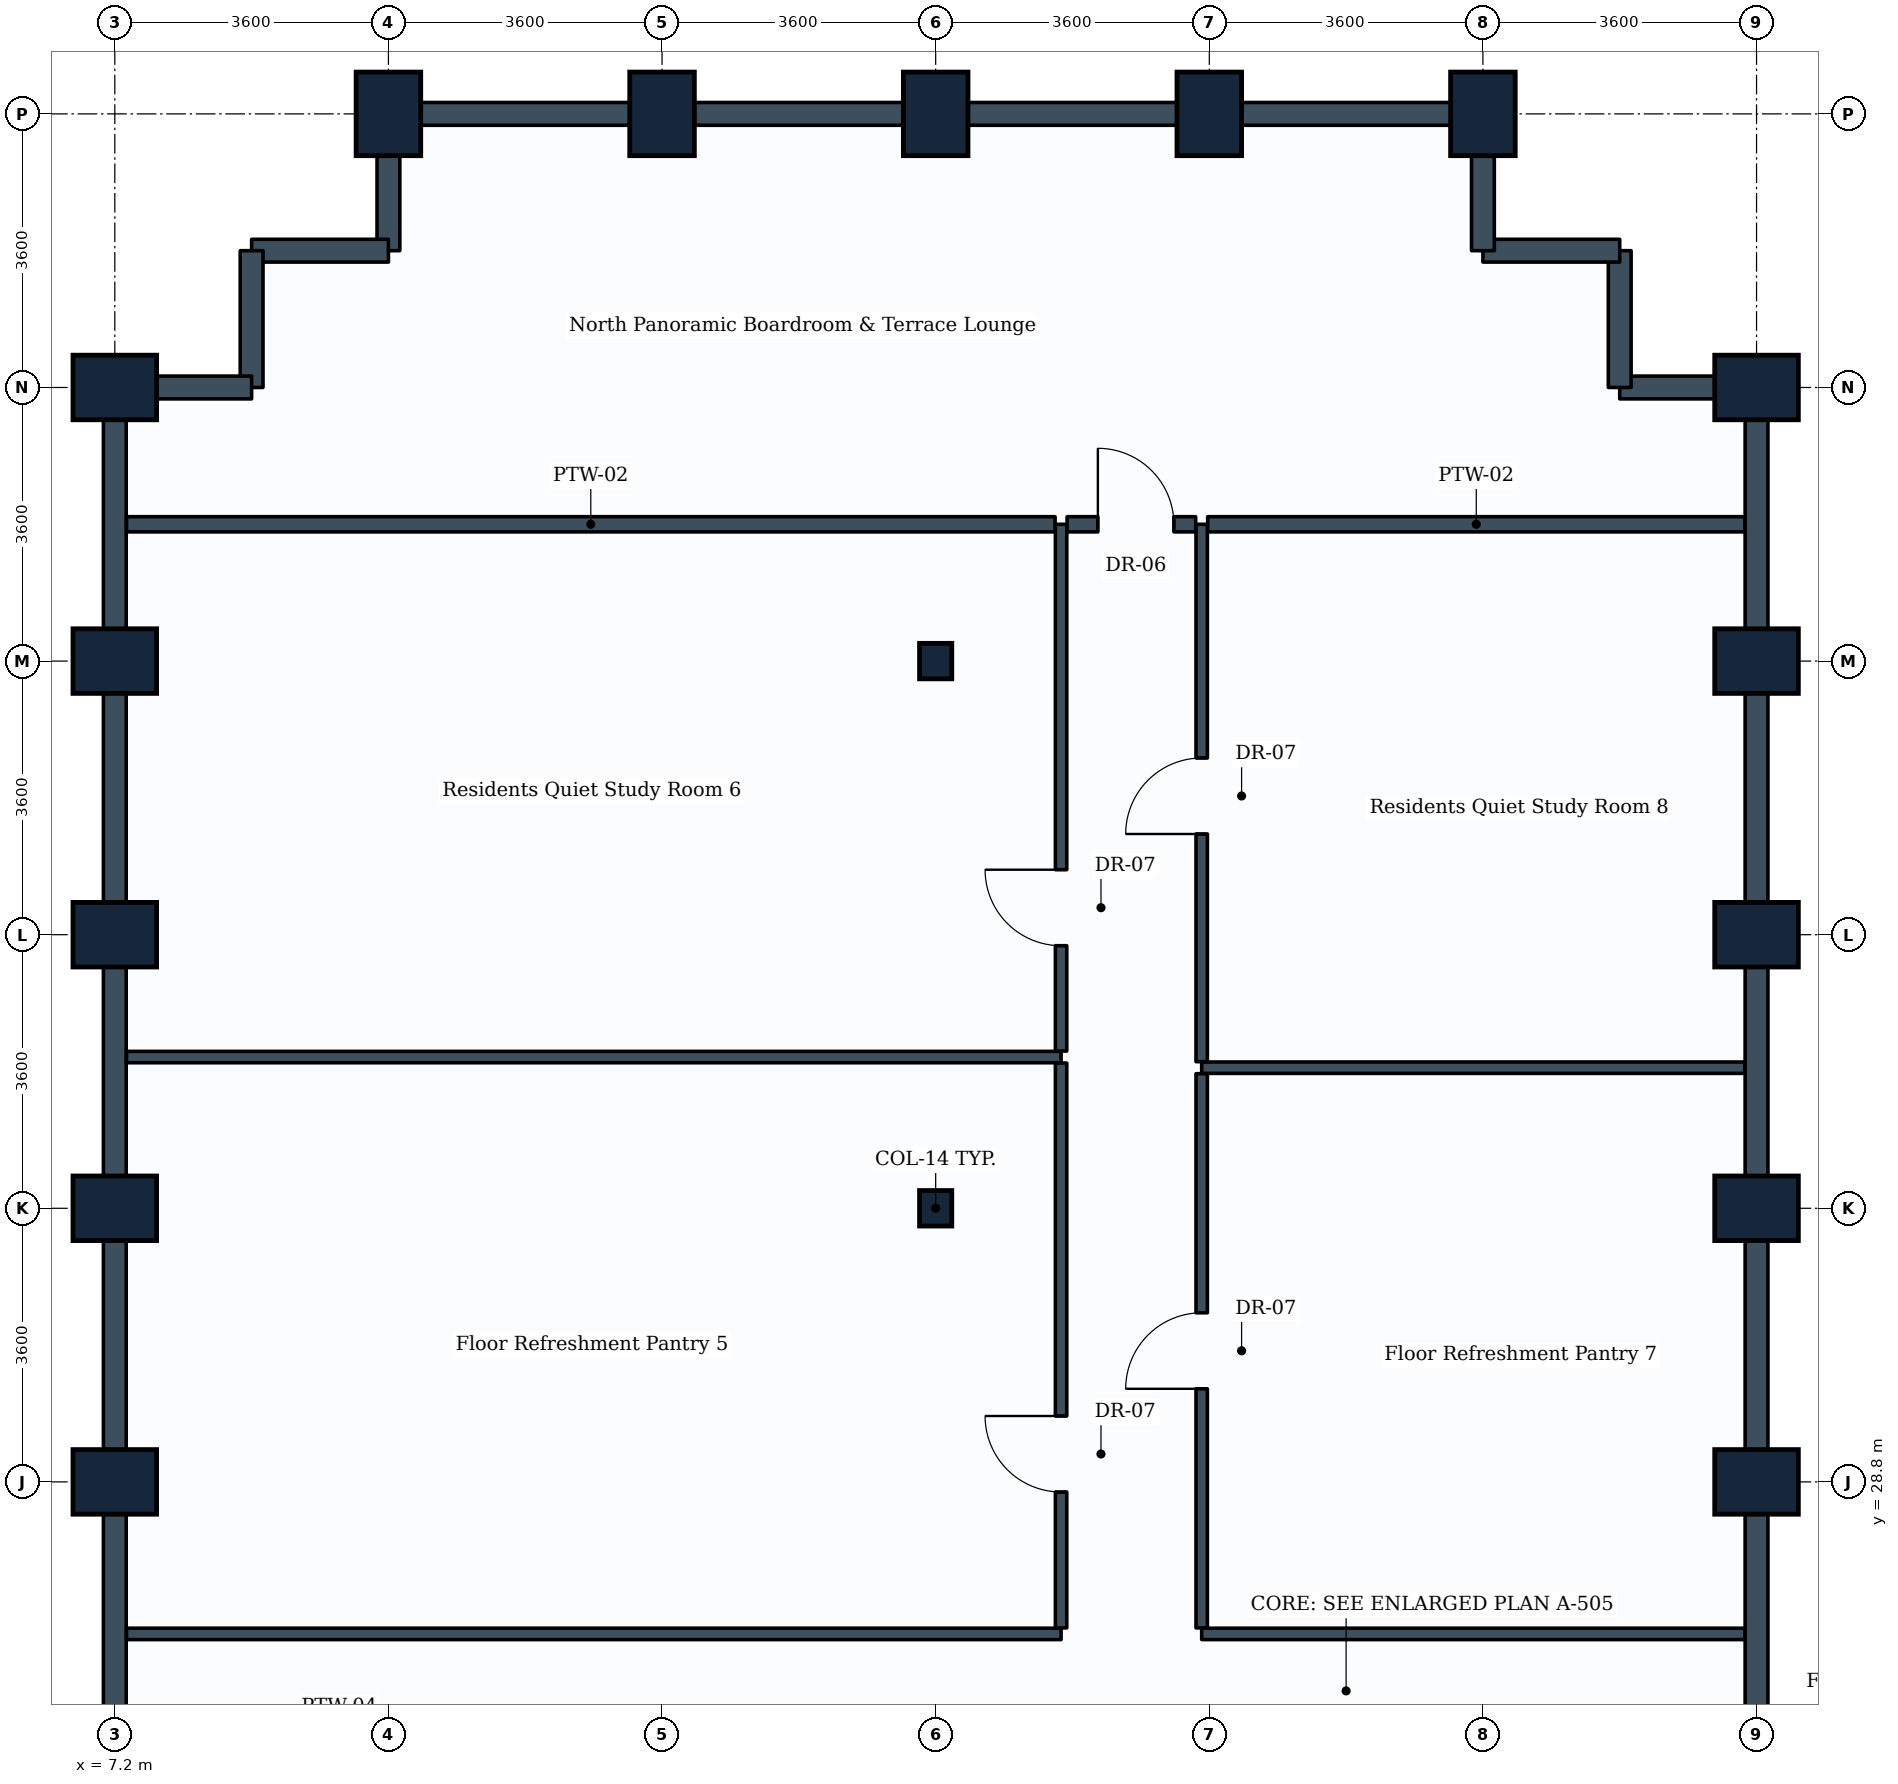
"""IFC4 building model, lengths in metres.
Left out: names, types, materials, properties, quantities, classifications, styles, units other than length and angle.
Written with IfcOpenShell. Run it as: python <this file> out.ifc"""

import sys

from ifc_helpers import new_model, si_unit, direction, frame, frame_2d, origin, origin_2d, place, context, subcontext, project, spatial, rectangle, i_section, extrude, element, fill, save


model = new_model("IFC4")
c1 = context("Model", 3, precision=1e-05, world=origin(), true_north=direction((0.0, 1.0)))
c2 = subcontext(c1, "Body", "Model", "MODEL_VIEW")
j1 = project(units=[si_unit("LENGTHUNIT", "METRE"), si_unit("PLANEANGLEUNIT", "RADIAN")], contexts=[c1])
p1 = place(None, origin())
s1 = spatial("IfcSite", under=j1, at=p1, CompositionType="ELEMENT")
p2 = place(p1, origin())
s2 = spatial("IfcBuilding", under=s1, at=p2, CompositionType="ELEMENT")
p3 = place(p2, frame((0.0, 0.0, 99.6)))
s3 = spatial("IfcBuildingStorey", under=s2, at=p3, CompositionType="ELEMENT", Elevation=99.6)
for number, where, z_axis, x_axis in (
    (1, (7.2, 28.8, 0.0), (0.0, 0.0, 1.0), (0.0, 1.0, 0.0)),
    (2, (7.2, 32.4, 0.0), (0.0, 0.0, 1.0), (0.0, 1.0, 0.0)),
    (3, (7.2, 36.0, 0.0), (0.0, 0.0, 1.0), (0.0, 1.0, 0.0)),
    (4, (7.2, 39.6, 0.0), (0.0, 0.0, 1.0), (0.0, 1.0, 0.0)),
    (5, (7.2, 43.2, 0.0), (0.0, 0.0, 1.0), (0.0, 1.0, 0.0)),
    (6, (10.8, 46.8, 0.0), (0.0, 0.0, 1.0), (1.0, 0.0, 0.0)),
    (7, (14.4, 46.8, 0.0), (0.0, 0.0, 1.0), (1.0, 0.0, 0.0)),
):
    element("IfcColumn", number, at=place(p3, frame(where, z_axis=z_axis, x_axis=x_axis)), inside=s3, PredefinedType="COLUMN", context=c2, shape_type="SweptSolid", body=[
        extrude(rectangle(XDim=0.85, YDim=1.1, at=origin_2d()), origin(), (0.0, 0.0, 1.0), 3.9),
    ])
for number, where, z_axis, x_axis in (
    (8, (18.0, 32.4, 0.0), (0.0, 0.0, 1.0), (1.0, 0.0, 0.0)),
    (9, (18.0, 39.6, 0.0), (0.0, 0.0, 1.0), (1.0, 0.0, 0.0)),
):
    element("IfcColumn", number, at=place(p3, frame(where, z_axis=z_axis, x_axis=x_axis)), inside=s3, PredefinedType="COLUMN", context=c2, shape_type="SweptSolid", body=[
        extrude(i_section(OverallWidth=0.424, OverallDepth=0.467, WebThickness=0.033, FlangeThickness=0.053, FilletRadius=0.015, at=origin_2d()), origin(), (0.0, 0.0, 1.0), 3.9),
    ])
for number, where, z_axis, x_axis in (
    (10, (18.0, 46.8, 0.0), (0.0, 0.0, 1.0), (1.0, 0.0, 0.0)),
    (11, (21.6, 46.8, 0.0), (0.0, 0.0, 1.0), (1.0, 0.0, 0.0)),
    (12, (25.2, 46.8, 0.0), (0.0, 0.0, 1.0), (1.0, 0.0, 0.0)),
    (13, (28.8, 28.8, 0.0), (0.0, 0.0, 1.0), (0.0, 1.0, 0.0)),
    (14, (28.8, 32.4, 0.0), (0.0, 0.0, 1.0), (0.0, 1.0, 0.0)),
    (15, (28.8, 36.0, 0.0), (0.0, 0.0, 1.0), (0.0, 1.0, 0.0)),
    (16, (28.8, 39.6, 0.0), (0.0, 0.0, 1.0), (0.0, 1.0, 0.0)),
    (17, (28.8, 43.2, 0.0), (0.0, 0.0, 1.0), (0.0, 1.0, 0.0)),
):
    element("IfcColumn", number, at=place(p3, frame(where, z_axis=z_axis, x_axis=x_axis)), inside=s3, PredefinedType="COLUMN", context=c2, shape_type="SweptSolid", body=[
        extrude(rectangle(XDim=0.85, YDim=1.1, at=origin_2d()), origin(), (0.0, 0.0, 1.0), 3.9),
    ])
p4 = place(p3, frame((28.8, 28.8, 0.0), z_axis=(0.0, 0.0, 1.0), x_axis=(0.0, -1.0, 0.0)))
e18 = element("IfcWall", 18, at=p4, inside=s3, PredefinedType="STANDARD", context=c2, shape_type="SweptSolid", body=[
    extrude(rectangle(XDim=3.6, YDim=0.3, at=frame_2d((1.8, 0.0))), origin(), (0.0, 0.0, 1.0), 3.19),
])
p5 = place(p3, frame((28.8, 32.4, 0.0), z_axis=(0.0, 0.0, 1.0), x_axis=(0.0, -1.0, 0.0)))
e19 = element("IfcWall", 19, at=p5, inside=s3, PredefinedType="STANDARD", context=c2, shape_type="SweptSolid", body=[
    extrude(rectangle(XDim=3.6, YDim=0.3, at=frame_2d((1.8, 0.0))), origin(), (0.0, 0.0, 1.0), 2.93),
])
for number, where, z_axis, x_axis in (
    (20, (28.8, 36.0, 0.0), (0.0, 0.0, 1.0), (0.0, -1.0, 0.0)),
    (21, (28.8, 39.6, 0.0), (0.0, 0.0, 1.0), (0.0, -1.0, 0.0)),
):
    element("IfcWall", number, at=place(p3, frame(where, z_axis=z_axis, x_axis=x_axis)), inside=s3, PredefinedType="STANDARD", context=c2, shape_type="SweptSolid", body=[
        extrude(rectangle(XDim=3.6, YDim=0.3, at=frame_2d((1.8, 0.0))), origin(), (0.0, 0.0, 1.0), 2.93),
    ])
p6 = place(p3, frame((28.8, 43.2, 0.0), z_axis=(0.0, 0.0, 1.0), x_axis=(0.0, -1.0, 0.0)))
e22 = element("IfcWall", 22, at=p6, inside=s3, PredefinedType="STANDARD", context=c2, shape_type="SweptSolid", body=[
    extrude(rectangle(XDim=3.6, YDim=0.3, at=frame_2d((1.8, 0.0))), origin(), (0.0, 0.0, 1.0), 2.93),
])
p7 = place(p3, frame((27.0, 43.2, 0.0), z_axis=(0.0, 0.0, 1.0), x_axis=(1.0, 0.0, 0.0)))
e23 = element("IfcWall", 23, at=p7, inside=s3, PredefinedType="STANDARD", context=c2, shape_type="SweptSolid", body=[
    extrude(rectangle(XDim=1.8, YDim=0.3, at=frame_2d((0.9, 0.0))), origin(), (0.0, 0.0, 1.0), 2.93),
])
for number, where, z_axis, x_axis in (
    (24, (27.0, 43.2, 0.0), (0.0, 0.0, 1.0), (0.0, 1.0, 0.0)),
    (25, (25.2, 45.0, 0.0), (0.0, 0.0, 1.0), (1.0, 0.0, 0.0)),
):
    element("IfcWall", number, at=place(p3, frame(where, z_axis=z_axis, x_axis=x_axis)), inside=s3, PredefinedType="STANDARD", context=c2, shape_type="SweptSolid", body=[
        extrude(rectangle(XDim=1.8, YDim=0.3, at=frame_2d((0.9, 0.0))), origin(), (0.0, 0.0, 1.0), 3.635),
    ])
p8 = place(p3, frame((25.2, 45.0, 0.0), z_axis=(0.0, 0.0, 1.0), x_axis=(0.0, 1.0, 0.0)))
e26 = element("IfcWall", 26, at=p8, inside=s3, PredefinedType="STANDARD", context=c2, shape_type="SweptSolid", body=[
    extrude(rectangle(XDim=1.8, YDim=0.3, at=frame_2d((0.9, 0.0))), origin(), (0.0, 0.0, 1.0), 2.93),
])
p9 = place(p3, frame((21.6, 46.8, 0.0), z_axis=(0.0, 0.0, 1.0), x_axis=(1.0, 0.0, 0.0)))
e27 = element("IfcWall", 27, at=p9, inside=s3, PredefinedType="STANDARD", context=c2, shape_type="SweptSolid", body=[
    extrude(rectangle(XDim=3.6, YDim=0.3, at=frame_2d((1.8, 0.0))), origin(), (0.0, 0.0, 1.0), 2.93),
])
for number, where, z_axis, x_axis in (
    (28, (18.0, 46.8, 0.0), (0.0, 0.0, 1.0), (1.0, 0.0, 0.0)),
    (29, (14.4, 46.8, 0.0), (0.0, 0.0, 1.0), (1.0, 0.0, 0.0)),
):
    element("IfcWall", number, at=place(p3, frame(where, z_axis=z_axis, x_axis=x_axis)), inside=s3, PredefinedType="STANDARD", context=c2, shape_type="SweptSolid", body=[
        extrude(rectangle(XDim=3.6, YDim=0.3, at=frame_2d((1.8, 0.0))), origin(), (0.0, 0.0, 1.0), 2.93),
    ])
p10 = place(p3, frame((10.8, 46.8, 0.0), z_axis=(0.0, 0.0, 1.0), x_axis=(1.0, 0.0, 0.0)))
e30 = element("IfcWall", 30, at=p10, inside=s3, PredefinedType="STANDARD", context=c2, shape_type="SweptSolid", body=[
    extrude(rectangle(XDim=3.6, YDim=0.3, at=frame_2d((1.8, 0.0))), origin(), (0.0, 0.0, 1.0), 2.93),
])
p11 = place(p3, frame((10.8, 45.0, 0.0), z_axis=(0.0, 0.0, 1.0), x_axis=(0.0, 1.0, 0.0)))
e31 = element("IfcWall", 31, at=p11, inside=s3, PredefinedType="STANDARD", context=c2, shape_type="SweptSolid", body=[
    extrude(rectangle(XDim=1.8, YDim=0.3, at=frame_2d((0.9, 0.0))), origin(), (0.0, 0.0, 1.0), 2.93),
])
for number, where, z_axis, x_axis in (
    (32, (9.0, 45.0, 0.0), (0.0, 0.0, 1.0), (1.0, 0.0, 0.0)),
    (33, (9.0, 43.2, 0.0), (0.0, 0.0, 1.0), (0.0, 1.0, 0.0)),
):
    element("IfcWall", number, at=place(p3, frame(where, z_axis=z_axis, x_axis=x_axis)), inside=s3, PredefinedType="STANDARD", context=c2, shape_type="SweptSolid", body=[
        extrude(rectangle(XDim=1.8, YDim=0.3, at=frame_2d((0.9, 0.0))), origin(), (0.0, 0.0, 1.0), 3.635),
    ])
p12 = place(p3, frame((7.2, 43.2, 0.0), z_axis=(0.0, 0.0, 1.0), x_axis=(1.0, 0.0, 0.0)))
e34 = element("IfcWall", 34, at=p12, inside=s3, PredefinedType="STANDARD", context=c2, shape_type="SweptSolid", body=[
    extrude(rectangle(XDim=1.8, YDim=0.3, at=frame_2d((0.9, 0.0))), origin(), (0.0, 0.0, 1.0), 2.93),
])
p13 = place(p3, frame((7.2, 39.6, 0.0), z_axis=(0.0, 0.0, 1.0), x_axis=(0.0, 1.0, 0.0)))
e35 = element("IfcWall", 35, at=p13, inside=s3, PredefinedType="STANDARD", context=c2, shape_type="SweptSolid", body=[
    extrude(rectangle(XDim=3.6, YDim=0.3, at=frame_2d((1.8, 0.0))), origin(), (0.0, 0.0, 1.0), 2.93),
])
for number, where, z_axis, x_axis in (
    (36, (7.2, 36.0, 0.0), (0.0, 0.0, 1.0), (0.0, 1.0, 0.0)),
    (37, (7.2, 32.4, 0.0), (0.0, 0.0, 1.0), (0.0, 1.0, 0.0)),
):
    element("IfcWall", number, at=place(p3, frame(where, z_axis=z_axis, x_axis=x_axis)), inside=s3, PredefinedType="STANDARD", context=c2, shape_type="SweptSolid", body=[
        extrude(rectangle(XDim=3.6, YDim=0.3, at=frame_2d((1.8, 0.0))), origin(), (0.0, 0.0, 1.0), 2.93),
    ])
p14 = place(p3, frame((7.2, 28.8, 0.0), z_axis=(0.0, 0.0, 1.0), x_axis=(0.0, 1.0, 0.0)))
e38 = element("IfcWall", 38, at=p14, inside=s3, PredefinedType="STANDARD", context=c2, shape_type="SweptSolid", body=[
    extrude(rectangle(XDim=3.6, YDim=0.3, at=frame_2d((1.8, 0.0))), origin(), (0.0, 0.0, 1.0), 2.93),
])
p15 = place(p3, frame((7.2, 25.2, 0.0), z_axis=(0.0, 0.0, 1.0), x_axis=(0.0, 1.0, 0.0)))
e39 = element("IfcWall", 39, at=p15, inside=s3, PredefinedType="STANDARD", context=c2, shape_type="SweptSolid", body=[
    extrude(rectangle(XDim=3.6, YDim=0.3, at=frame_2d((1.8, 0.0))), origin(), (0.0, 0.0, 1.0), 2.93),
])
for number, where, z_axis, x_axis in (
    (40, (7.354, 26.8, 0.0), (0.0, 0.0, 1.0), (1.0, 0.0, 0.0)),
    (41, (7.354, 34.39, 0.0), (0.0, 0.0, 1.0), (1.0, 0.0, 0.0)),
):
    element("IfcWall", number, at=place(p3, frame(where, z_axis=z_axis, x_axis=x_axis)), inside=s3, PredefinedType="PARTITIONING", context=c2, shape_type="SweptSolid", body=[
        extrude(rectangle(XDim=12.296, YDim=0.15, at=frame_2d((6.148, 0.0))), origin(), (0.0, 0.0, 1.0), 2.93),
    ])
p16 = place(p3, frame((19.65, 26.879, 0.0), z_axis=(0.0, 0.0, 1.0), x_axis=(0.0, 1.0, 0.0)))
e42 = element("IfcWall", 42, at=p16, inside=s3, PredefinedType="PARTITIONING", context=c2, shape_type="SweptSolid", body=[
    extrude(rectangle(XDim=7.432, YDim=0.15, at=frame_2d((3.716, 0.0))), origin(), (0.0, 0.0, 1.0), 3.19),
])
p17 = place(p16, frame((1.788, 0.0, 0.0)))
e43 = element("IfcOpeningElement", 43, at=p17, cuts=e42, PredefinedType="OPENING", context=c2, shape_type="SweptSolid", body=[
    extrude(rectangle(XDim=1.0, YDim=2.1, at=frame_2d((0.5, 1.05))), frame((0.0, 0.085, 0.0), z_axis=(0.0, -1.0, 0.0), x_axis=(1.0, 0.0, 0.0)), (0.0, 0.0, 1.0), 0.17),
])
p18 = place(p3, frame((19.65, 34.469, 0.0), z_axis=(0.0, 0.0, 1.0), x_axis=(0.0, 1.0, 0.0)))
e44 = element("IfcWall", 44, at=p18, inside=s3, PredefinedType="PARTITIONING", context=c2, shape_type="SweptSolid", body=[
    extrude(rectangle(XDim=6.931, YDim=0.15, at=frame_2d((3.465, 0.0))), origin(), (0.0, 0.0, 1.0), 3.19),
])
p19 = place(p18, frame((1.386, 0.0, 0.0)))
e45 = element("IfcOpeningElement", 45, at=p19, cuts=e44, PredefinedType="OPENING", context=c2, shape_type="SweptSolid", body=[
    extrude(rectangle(XDim=1.0, YDim=2.1, at=frame_2d((0.5, 1.05))), frame((0.0, 0.085, 0.0), z_axis=(0.0, -1.0, 0.0), x_axis=(1.0, 0.0, 0.0)), (0.0, 0.0, 1.0), 0.17),
])
p20 = place(p3, frame((21.5, 26.8, 0.0), z_axis=(0.0, 0.0, 1.0), x_axis=(1.0, 0.0, 0.0)))
e46 = element("IfcWall", 46, at=p20, inside=s3, PredefinedType="PARTITIONING", context=c2, shape_type="SweptSolid", body=[
    extrude(rectangle(XDim=7.146, YDim=0.15, at=frame_2d((3.573, 0.0))), origin(), (0.0, 0.0, 1.0), 3.635),
])
p21 = place(p3, frame((21.5, 34.25, 0.0), z_axis=(0.0, 0.0, 1.0), x_axis=(1.0, 0.0, 0.0)))
e47 = element("IfcWall", 47, at=p21, inside=s3, PredefinedType="PARTITIONING", context=c2, shape_type="SweptSolid", body=[
    extrude(rectangle(XDim=7.146, YDim=0.15, at=frame_2d((3.573, 0.0))), origin(), (0.0, 0.0, 1.0), 2.93),
])
p22 = place(p3, frame((21.5, 26.879, 0.0), z_axis=(0.0, 0.0, 1.0), x_axis=(0.0, 1.0, 0.0)))
e48 = element("IfcWall", 48, at=p22, inside=s3, PredefinedType="PARTITIONING", context=c2, shape_type="SweptSolid", body=[
    extrude(rectangle(XDim=7.292, YDim=0.15, at=frame_2d((3.646, 0.0))), origin(), (0.0, 0.0, 1.0), 3.19),
])
p23 = place(p22, frame((3.146, 0.0, 0.0)))
e49 = element("IfcOpeningElement", 49, at=p23, cuts=e48, PredefinedType="OPENING", context=c2, shape_type="SweptSolid", body=[
    extrude(rectangle(XDim=1.0, YDim=2.1, at=frame_2d((0.5, 1.05))), frame((0.0, 0.085, 0.0), z_axis=(0.0, -1.0, 0.0), x_axis=(1.0, 0.0, 0.0)), (0.0, 0.0, 1.0), 0.17),
])
p24 = place(p3, frame((21.5, 34.329, 0.0), z_axis=(0.0, 0.0, 1.0), x_axis=(0.0, 1.0, 0.0)))
e50 = element("IfcWall", 50, at=p24, inside=s3, PredefinedType="PARTITIONING", context=c2, shape_type="SweptSolid", body=[
    extrude(rectangle(XDim=7.071, YDim=0.15, at=frame_2d((3.535, 0.0))), origin(), (0.0, 0.0, 1.0), 3.18),
])
p25 = place(p24, frame((2.996, 0.0, 0.0)))
e51 = element("IfcOpeningElement", 51, at=p25, cuts=e50, PredefinedType="OPENING", context=c2, shape_type="SweptSolid", body=[
    extrude(rectangle(XDim=1.0, YDim=2.1, at=frame_2d((0.5, 1.05))), frame((0.0, 0.085, 0.0), z_axis=(0.0, -1.0, 0.0), x_axis=(1.0, 0.0, 0.0)), (0.0, 0.0, 1.0), 0.17),
])
p26 = place(p3, frame((7.354, 41.4, 0.0), z_axis=(0.0, 0.0, 1.0), x_axis=(1.0, 0.0, 0.0)))
e52 = element("IfcWall", 52, at=p26, inside=s3, PredefinedType="PARTITIONING", context=c2, shape_type="SweptSolid", body=[
    extrude(rectangle(XDim=12.217, YDim=0.2, at=frame_2d((6.108, 0.0))), origin(), (0.0, 0.0, 1.0), 2.93),
])
p27 = place(p3, frame((21.579, 41.4, 0.0), z_axis=(0.0, 0.0, 1.0), x_axis=(1.0, 0.0, 0.0)))
e53 = element("IfcWall", 53, at=p27, inside=s3, PredefinedType="PARTITIONING", context=c2, shape_type="SweptSolid", body=[
    extrude(rectangle(XDim=7.067, YDim=0.2, at=frame_2d((3.533, 0.0))), origin(), (0.0, 0.0, 1.0), 2.93),
])
p28 = place(p3, frame((19.729, 41.4, 0.0), z_axis=(0.0, 0.0, 1.0), x_axis=(1.0, 0.0, 0.0)))
e54 = element("IfcWall", 54, at=p28, inside=s3, PredefinedType="PARTITIONING", context=c2, shape_type="SweptSolid", body=[
    extrude(rectangle(XDim=1.692, YDim=0.2, at=frame_2d((0.846, 0.0))), origin(), (0.0, 0.0, 1.0), 3.635),
])
p29 = place(p28, frame((0.405, 0.0, 0.0)))
e55 = element("IfcOpeningElement", 55, at=p29, cuts=e54, PredefinedType="OPENING", context=c2, shape_type="SweptSolid", body=[
    extrude(rectangle(XDim=1.0, YDim=2.1, at=frame_2d((0.5, 1.05))), frame((0.0, 0.11, 0.0), z_axis=(0.0, -1.0, 0.0), x_axis=(1.0, 0.0, 0.0)), (0.0, 0.0, 1.0), 0.22),
])
p30 = place(p17, origin())
e56 = element("IfcDoor", 56, at=p30, inside=s3, OperationType="SINGLE_SWING_RIGHT", PredefinedType="DOOR", context=c2, shape_type="SweptSolid", body=[
    extrude(rectangle(XDim=1.0, YDim=2.1, at=frame_2d((0.5, 1.05))), frame((0.0, 0.025, 0.0), z_axis=(0.0, -1.0, 0.0), x_axis=(1.0, 0.0, 0.0)), (0.0, 0.0, 1.0), 0.05),
])
fill(e43, e56)
p31 = place(p19, origin())
e57 = element("IfcDoor", 57, at=p31, inside=s3, OperationType="SINGLE_SWING_RIGHT", PredefinedType="DOOR", context=c2, shape_type="SweptSolid", body=[
    extrude(rectangle(XDim=1.0, YDim=2.1, at=frame_2d((0.5, 1.05))), frame((0.0, 0.025, 0.0), z_axis=(0.0, -1.0, 0.0), x_axis=(1.0, 0.0, 0.0)), (0.0, 0.0, 1.0), 0.05),
])
fill(e45, e57)
p32 = place(p23, origin())
e58 = element("IfcDoor", 58, at=p32, inside=s3, OperationType="SINGLE_SWING_LEFT", PredefinedType="DOOR", context=c2, shape_type="SweptSolid", body=[
    extrude(rectangle(XDim=1.0, YDim=2.1, at=frame_2d((0.5, 1.05))), frame((0.0, 0.025, 0.0), z_axis=(0.0, -1.0, 0.0), x_axis=(1.0, 0.0, 0.0)), (0.0, 0.0, 1.0), 0.05),
])
fill(e49, e58)
p33 = place(p25, origin())
e59 = element("IfcDoor", 59, at=p33, inside=s3, OperationType="SINGLE_SWING_LEFT", PredefinedType="DOOR", context=c2, shape_type="SweptSolid", body=[
    extrude(rectangle(XDim=1.0, YDim=2.1, at=frame_2d((0.5, 1.05))), frame((0.0, 0.025, 0.0), z_axis=(0.0, -1.0, 0.0), x_axis=(1.0, 0.0, 0.0)), (0.0, 0.0, 1.0), 0.05),
])
fill(e51, e59)
p34 = place(p29, origin())
e60 = element("IfcDoor", 60, at=p34, inside=s3, OperationType="SINGLE_SWING_LEFT", PredefinedType="DOOR", context=c2, shape_type="SweptSolid", body=[
    extrude(rectangle(XDim=1.0, YDim=2.1, at=frame_2d((0.5, 1.05))), frame((0.0, 0.025, 0.0), z_axis=(0.0, -1.0, 0.0), x_axis=(1.0, 0.0, 0.0)), (0.0, 0.0, 1.0), 0.05),
])
fill(e55, e60)
save(model, sys.argv[1])
